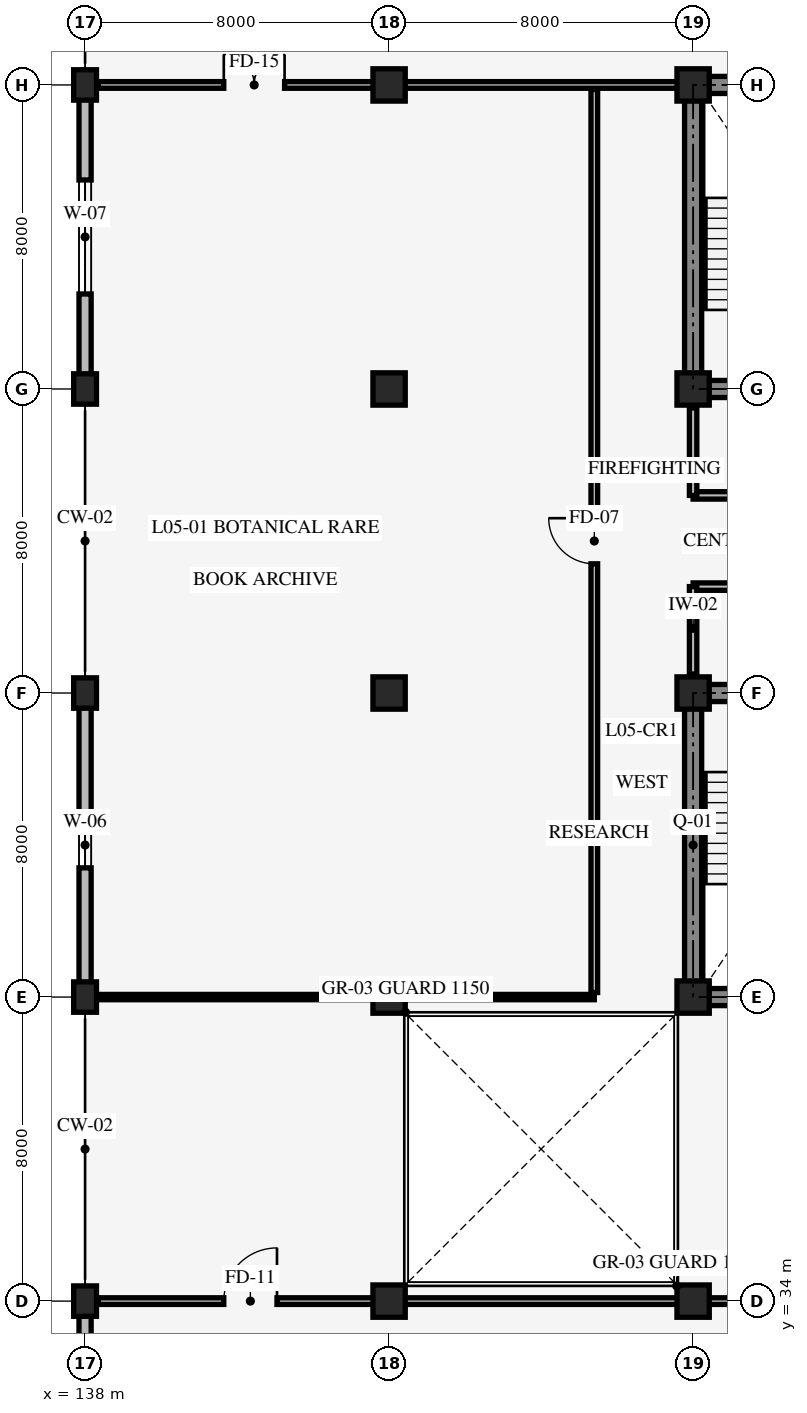
"""IFC4 building model, lengths in metres.
Left out: names, types, materials, properties, quantities, classifications, styles, units other than length and angle.
Written with IfcOpenShell. Run it as: python <this file> out.ifc"""

import sys

from ifc_helpers import new_model, si_unit, direction, frame, frame_2d, origin, origin_2d, place, context, subcontext, project, spatial, rectangle, extrude, element, fill, save


model = new_model("IFC4")
c1 = context("Model", 3, precision=1e-05, world=origin(), true_north=direction((0.0, 1.0)))
c2 = subcontext(c1, "Body", "Model", "MODEL_VIEW")
j1 = project(units=[si_unit("LENGTHUNIT", "METRE"), si_unit("PLANEANGLEUNIT", "RADIAN")], contexts=[c1])
p1 = place(None, origin())
s1 = spatial("IfcSite", under=j1, at=p1, CompositionType="ELEMENT")
p2 = place(p1, origin())
s2 = spatial("IfcBuilding", under=s1, at=p2, CompositionType="ELEMENT")
p3 = place(p2, frame((0.0, 0.0, 19.2)))
s3 = spatial("IfcBuildingStorey", under=s2, at=p3, CompositionType="ELEMENT", Elevation=19.2)
p4 = place(p3, frame((154.0, 42.0, 0.0), z_axis=(0.0, 0.0, 1.0), x_axis=(1.0, 0.0, 0.0)))
e1 = element("IfcWall", 1, at=p4, inside=s3, PredefinedType="SHEAR", context=c2, shape_type="SweptSolid", body=[
    extrude(rectangle(XDim=8.0, YDim=0.45, at=frame_2d((4.0, 0.0))), origin(), (0.0, 0.0, 1.0), 3.95),
])
p5 = place(p3, frame((162.0, 50.0, 0.0), z_axis=(0.0, 0.0, 1.0), x_axis=(-1.0, 0.0, 0.0)))
e2 = element("IfcWall", 2, at=p5, inside=s3, PredefinedType="SHEAR", context=c2, shape_type="SweptSolid", body=[
    extrude(rectangle(XDim=8.0, YDim=0.45, at=frame_2d((4.0, 0.0))), origin(), (0.0, 0.0, 1.0), 3.95),
])
p6 = place(p5, frame((5.3, 0.0, 0.0)))
e3 = element("IfcOpeningElement", 3, at=p6, cuts=e2, PredefinedType="OPENING", context=c2, shape_type="SweptSolid", body=[
    extrude(rectangle(XDim=1.3, YDim=2.15, at=frame_2d((0.65, 1.075))), frame((0.0, 0.235, 0.0), z_axis=(0.0, -1.0, 0.0), x_axis=(1.0, 0.0, 0.0)), (0.0, 0.0, 1.0), 0.47),
])
p7 = place(p5, frame((1.45, 0.0, 0.0)))
e4 = element("IfcOpeningElement", 4, at=p7, cuts=e2, PredefinedType="OPENING", context=c2, shape_type="SweptSolid", body=[
    extrude(rectangle(XDim=1.1, YDim=2.2, at=frame_2d((0.55, 1.1))), frame((0.0, 0.235, 0.0), z_axis=(0.0, -1.0, 0.0), x_axis=(1.0, 0.0, 0.0)), (0.0, 0.0, 1.0), 0.47),
])
p8 = place(p3, frame((154.0, 50.0, 0.0), z_axis=(0.0, 0.0, 1.0), x_axis=(0.0, -1.0, 0.0)))
e5 = element("IfcWall", 5, at=p8, inside=s3, PredefinedType="SHEAR", context=c2, shape_type="SweptSolid", body=[
    extrude(rectangle(XDim=8.0, YDim=0.45, at=frame_2d((4.0, 0.0))), origin(), (0.0, 0.0, 1.0), 3.95),
])
p9 = place(p3, frame((154.0, 58.0, 0.0), z_axis=(0.0, 0.0, 1.0), x_axis=(1.0, 0.0, 0.0)))
e6 = element("IfcWall", 6, at=p9, inside=s3, PredefinedType="SHEAR", context=c2, shape_type="SweptSolid", body=[
    extrude(rectangle(XDim=8.0, YDim=0.45, at=frame_2d((4.0, 0.0))), origin(), (0.0, 0.0, 1.0), 3.95),
])
p10 = place(p9, frame((1.4, 0.0, 0.0)))
e7 = element("IfcOpeningElement", 7, at=p10, cuts=e6, PredefinedType="OPENING", context=c2, shape_type="SweptSolid", body=[
    extrude(rectangle(XDim=1.3, YDim=2.15, at=frame_2d((0.65, 1.075))), frame((0.0, 0.235, 0.0), z_axis=(0.0, -1.0, 0.0), x_axis=(1.0, 0.0, 0.0)), (0.0, 0.0, 1.0), 0.47),
])
p11 = place(p9, frame((5.3, 0.0, 0.0)))
e8 = element("IfcOpeningElement", 8, at=p11, cuts=e6, PredefinedType="OPENING", context=c2, shape_type="SweptSolid", body=[
    extrude(rectangle(XDim=1.1, YDim=2.2, at=frame_2d((0.55, 1.1))), frame((0.0, 0.235, 0.0), z_axis=(0.0, -1.0, 0.0), x_axis=(1.0, 0.0, 0.0)), (0.0, 0.0, 1.0), 0.47),
])
for number, where, z_axis, x_axis in (
    (9, (162.0, 66.0, 0.0), (0.0, 0.0, 1.0), (-1.0, 0.0, 0.0)),
    (10, (154.0, 66.0, 0.0), (0.0, 0.0, 1.0), (0.0, -1.0, 0.0)),
):
    element("IfcWall", number, at=place(p3, frame(where, z_axis=z_axis, x_axis=x_axis)), inside=s3, PredefinedType="SHEAR", context=c2, shape_type="SweptSolid", body=[
        extrude(rectangle(XDim=8.0, YDim=0.45, at=frame_2d((4.0, 0.0))), origin(), (0.0, 0.0, 1.0), 3.95),
    ])
for number, where, z_axis, x_axis in (
    (11, (138.0, 34.0, 0.0), (0.0, 0.0, 1.0), (1.0, 0.0, 0.0)),
    (12, (138.0, 42.0, 0.0), (0.0, 0.0, 1.0), (1.0, 0.0, 0.0)),
    (13, (138.0, 50.0, 0.0), (0.0, 0.0, 1.0), (1.0, 0.0, 0.0)),
    (14, (138.0, 58.0, 0.0), (0.0, 0.0, 1.0), (1.0, 0.0, 0.0)),
    (15, (138.0, 66.0, 0.0), (0.0, 0.0, 1.0), (1.0, 0.0, 0.0)),
):
    element("IfcColumn", number, at=place(p3, frame(where, z_axis=z_axis, x_axis=x_axis)), inside=s3, PredefinedType="COLUMN", context=c2, shape_type="SweptSolid", body=[
        extrude(rectangle(XDim=0.6, YDim=0.8, at=origin_2d()), origin(), (0.0, 0.0, 1.0), 4.2),
    ])
for number, where, z_axis, x_axis in (
    (16, (146.0, 34.0, 0.0), (0.0, 0.0, 1.0), (1.0, 0.0, 0.0)),
    (17, (146.0, 42.0, 0.0), (0.0, 0.0, 1.0), (1.0, 0.0, 0.0)),
    (18, (146.0, 50.0, 0.0), (0.0, 0.0, 1.0), (1.0, 0.0, 0.0)),
    (19, (146.0, 58.0, 0.0), (0.0, 0.0, 1.0), (1.0, 0.0, 0.0)),
    (20, (146.0, 66.0, 0.0), (0.0, 0.0, 1.0), (1.0, 0.0, 0.0)),
    (21, (154.0, 34.0, 0.0), (0.0, 0.0, 1.0), (1.0, 0.0, 0.0)),
    (22, (154.0, 42.0, 0.0), (0.0, 0.0, 1.0), (1.0, 0.0, 0.0)),
    (23, (154.0, 50.0, 0.0), (0.0, 0.0, 1.0), (1.0, 0.0, 0.0)),
    (24, (154.0, 58.0, 0.0), (0.0, 0.0, 1.0), (1.0, 0.0, 0.0)),
    (25, (154.0, 66.0, 0.0), (0.0, 0.0, 1.0), (1.0, 0.0, 0.0)),
):
    element("IfcColumn", number, at=place(p3, frame(where, z_axis=z_axis, x_axis=x_axis)), inside=s3, PredefinedType="COLUMN", context=c2, shape_type="SweptSolid", body=[
        extrude(rectangle(XDim=0.85, YDim=0.85, at=origin_2d()), origin(), (0.0, 0.0, 1.0), 4.2),
    ])
p12 = place(p3, frame((138.0, 26.0, 0.0), z_axis=(0.0, 0.0, 1.0), x_axis=(0.0, 1.0, 0.0)))
e26 = element("IfcWall", 26, at=p12, inside=s3, PredefinedType="STANDARD", context=c2, shape_type="SweptSolid", body=[
    extrude(rectangle(XDim=8.0, YDim=0.32, at=frame_2d((4.0, 0.0))), origin(), (0.0, 0.0, 1.0), 3.19),
])
p13 = place(p12, frame((3.25, 0.0, 0.85)))
e27 = element("IfcOpeningElement", 27, at=p13, cuts=e26, PredefinedType="OPENING", context=c2, shape_type="SweptSolid", body=[
    extrude(rectangle(XDim=1.5, YDim=1.5, at=frame_2d((0.75, 0.75))), frame((0.0, 0.17, 0.0), z_axis=(0.0, -1.0, 0.0), x_axis=(1.0, 0.0, 0.0)), (0.0, 0.0, 1.0), 0.34),
])
p14 = place(p3, frame((138.0, 42.0, 0.0), z_axis=(0.0, 0.0, 1.0), x_axis=(0.0, 1.0, 0.0)))
e28 = element("IfcWall", 28, at=p14, inside=s3, PredefinedType="STANDARD", context=c2, shape_type="SweptSolid", body=[
    extrude(rectangle(XDim=8.0, YDim=0.32, at=frame_2d((4.0, 0.0))), origin(), (0.0, 0.0, 1.0), 3.19),
])
p15 = place(p14, frame((3.4, 0.0, 0.85)))
e29 = element("IfcOpeningElement", 29, at=p15, cuts=e28, PredefinedType="OPENING", context=c2, shape_type="SweptSolid", body=[
    extrude(rectangle(XDim=1.2, YDim=1.2, at=frame_2d((0.6, 0.6))), frame((0.0, 0.17, 0.0), z_axis=(0.0, -1.0, 0.0), x_axis=(1.0, 0.0, 0.0)), (0.0, 0.0, 1.0), 0.34),
])
p16 = place(p3, frame((138.0, 58.0, 0.0), z_axis=(0.0, 0.0, 1.0), x_axis=(0.0, 1.0, 0.0)))
e30 = element("IfcWall", 30, at=p16, inside=s3, PredefinedType="STANDARD", context=c2, shape_type="SweptSolid", body=[
    extrude(rectangle(XDim=8.0, YDim=0.32, at=frame_2d((4.0, 0.0))), origin(), (0.0, 0.0, 1.0), 3.19),
])
p17 = place(p16, frame((2.5, 0.0, 0.85)))
e31 = element("IfcOpeningElement", 31, at=p17, cuts=e30, PredefinedType="OPENING", context=c2, shape_type="SweptSolid", body=[
    extrude(rectangle(XDim=3.0, YDim=1.8, at=frame_2d((1.5, 0.9))), frame((0.0, 0.17, 0.0), z_axis=(0.0, -1.0, 0.0), x_axis=(1.0, 0.0, 0.0)), (0.0, 0.0, 1.0), 0.34),
])
p18 = place(p3, frame((154.0, 52.8, 0.0), z_axis=(0.0, 0.0, 1.0), x_axis=(1.0, 0.0, 0.0)))
e32 = element("IfcWall", 32, at=p18, inside=s3, PredefinedType="STANDARD", context=c2, shape_type="SweptSolid", body=[
    extrude(rectangle(XDim=7.6, YDim=0.195, at=frame_2d((3.8, 0.0))), origin(), (0.0, 0.0, 1.0), 3.9),
])
p19 = place(p18, frame((2.8, 0.0, 0.0)))
e33 = element("IfcOpeningElement", 33, at=p19, cuts=e32, PredefinedType="OPENING", context=c2, shape_type="SweptSolid", body=[
    extrude(rectangle(XDim=1.45, YDim=2.2, at=frame_2d((0.725, 1.1))), frame((0.0, 0.107, 0.0), z_axis=(0.0, -1.0, 0.0), x_axis=(1.0, 0.0, 0.0)), (0.0, 0.0, 1.0), 0.215),
])
p20 = place(p3, frame((154.0, 50.5, 0.0), z_axis=(0.0, 0.0, 1.0), x_axis=(0.0, 1.0, 0.0)))
e34 = element("IfcWall", 34, at=p20, inside=s3, PredefinedType="STANDARD", context=c2, shape_type="SweptSolid", body=[
    extrude(rectangle(XDim=2.3, YDim=0.195, at=frame_2d((1.15, 0.0))), origin(), (0.0, 0.0, 1.0), 3.19),
])
p21 = place(p3, frame((154.0, 55.2, 0.0), z_axis=(0.0, 0.0, 1.0), x_axis=(1.0, 0.0, 0.0)))
e35 = element("IfcWall", 35, at=p21, inside=s3, PredefinedType="STANDARD", context=c2, shape_type="SweptSolid", body=[
    extrude(rectangle(XDim=7.6, YDim=0.195, at=frame_2d((3.8, 0.0))), origin(), (0.0, 0.0, 1.0), 3.9),
])
p22 = place(p21, frame((2.8, 0.0, 0.0)))
e36 = element("IfcOpeningElement", 36, at=p22, cuts=e35, PredefinedType="OPENING", context=c2, shape_type="SweptSolid", body=[
    extrude(rectangle(XDim=1.25, YDim=2.15, at=frame_2d((0.625, 1.075))), frame((0.0, 0.107, 0.0), z_axis=(0.0, -1.0, 0.0), x_axis=(1.0, 0.0, 0.0)), (0.0, 0.0, 1.0), 0.215),
])
p23 = place(p3, frame((154.0, 55.2, 0.0), z_axis=(0.0, 0.0, 1.0), x_axis=(0.0, 1.0, 0.0)))
e37 = element("IfcWall", 37, at=p23, inside=s3, PredefinedType="STANDARD", context=c2, shape_type="SweptSolid", body=[
    extrude(rectangle(XDim=2.3, YDim=0.195, at=frame_2d((1.15, 0.0))), origin(), (0.0, 0.0, 1.0), 3.19),
])
p24 = place(p3, frame((138.12, 42.0, 0.0), z_axis=(0.0, 0.0, 1.0), x_axis=(1.0, 0.0, 0.0)))
e38 = element("IfcWall", 38, at=p24, inside=s3, PredefinedType="STANDARD", context=c2, shape_type="SweptSolid", body=[
    extrude(rectangle(XDim=13.28, YDim=0.14, at=frame_2d((6.64, 0.0))), origin(), (0.0, 0.0, 1.0), 3.14),
])
p25 = place(p3, frame((151.4, 42.12, 0.0), z_axis=(0.0, 0.0, 1.0), x_axis=(0.0, 1.0, 0.0)))
e39 = element("IfcWall", 39, at=p25, inside=s3, PredefinedType="STANDARD", context=c2, shape_type="SweptSolid", body=[
    extrude(rectangle(XDim=23.76, YDim=0.175, at=frame_2d((11.88, 0.0))), origin(), (0.0, 0.0, 1.0), 3.9),
])
p26 = place(p25, frame((11.28, 0.0, 0.0)))
e40 = element("IfcOpeningElement", 40, at=p26, cuts=e39, PredefinedType="OPENING", context=c2, shape_type="SweptSolid", body=[
    extrude(rectangle(XDim=1.2, YDim=2.1, at=frame_2d((0.6, 1.05))), frame((0.0, 0.098, 0.0), z_axis=(0.0, -1.0, 0.0), x_axis=(1.0, 0.0, 0.0)), (0.0, 0.0, 1.0), 0.195),
])
p27 = place(p3, frame((138.35, 34.0, 0.0), z_axis=(0.0, 0.0, 1.0), x_axis=(1.0, 0.0, 0.0)))
e41 = element("IfcWall", 41, at=p27, inside=s3, PredefinedType="STANDARD", context=c2, shape_type="SweptSolid", body=[
    extrude(rectangle(XDim=19.3, YDim=0.175, at=frame_2d((9.65, 0.0))), origin(), (0.0, 0.0, 1.0), 3.14),
])
p28 = place(p27, frame((3.3, 0.0, 0.0)))
e42 = element("IfcOpeningElement", 42, at=p28, cuts=e41, PredefinedType="OPENING", context=c2, shape_type="SweptSolid", body=[
    extrude(rectangle(XDim=1.4, YDim=2.2, at=frame_2d((0.7, 1.1))), frame((0.0, 0.098, 0.0), z_axis=(0.0, -1.0, 0.0), x_axis=(1.0, 0.0, 0.0)), (0.0, 0.0, 1.0), 0.195),
])
p29 = place(p3, frame((138.35, 66.0, 0.0), z_axis=(0.0, 0.0, 1.0), x_axis=(1.0, 0.0, 0.0)))
e43 = element("IfcWall", 43, at=p29, inside=s3, PredefinedType="STANDARD", context=c2, shape_type="SweptSolid", body=[
    extrude(rectangle(XDim=15.3, YDim=0.175, at=frame_2d((7.65, 0.0))), origin(), (0.0, 0.0, 1.0), 3.14),
])
p30 = place(p29, frame((3.3, 0.0, 0.0)))
e44 = element("IfcOpeningElement", 44, at=p30, cuts=e43, PredefinedType="OPENING", context=c2, shape_type="SweptSolid", body=[
    extrude(rectangle(XDim=1.6, YDim=2.25, at=frame_2d((0.8, 1.125))), frame((0.0, 0.098, 0.0), z_axis=(0.0, -1.0, 0.0), x_axis=(1.0, 0.0, 0.0)), (0.0, 0.0, 1.0), 0.195),
])
p31 = place(p15, origin())
e45 = element("IfcWindow", 45, at=p31, inside=s3, PartitioningType="SINGLE_PANEL", PredefinedType="WINDOW", context=c2, shape_type="SweptSolid", body=[
    extrude(rectangle(XDim=1.2, YDim=1.2, at=frame_2d((0.6, 0.6))), frame((0.0, 0.03, 0.0), z_axis=(0.0, -1.0, 0.0), x_axis=(1.0, 0.0, 0.0)), (0.0, 0.0, 1.0), 0.06),
])
fill(e29, e45)
p32 = place(p17, origin())
e46 = element("IfcWindow", 46, at=p32, inside=s3, PartitioningType="SINGLE_PANEL", PredefinedType="WINDOW", context=c2, shape_type="SweptSolid", body=[
    extrude(rectangle(XDim=3.0, YDim=1.8, at=frame_2d((1.5, 0.9))), frame((0.0, 0.03, 0.0), z_axis=(0.0, -1.0, 0.0), x_axis=(1.0, 0.0, 0.0)), (0.0, 0.0, 1.0), 0.06),
])
fill(e31, e46)
p33 = place(p26, origin())
e47 = element("IfcDoor", 47, at=p33, inside=s3, OperationType="SINGLE_SWING_RIGHT", PredefinedType="DOOR", context=c2, shape_type="SweptSolid", body=[
    extrude(rectangle(XDim=1.2, YDim=2.1, at=frame_2d((0.6, 1.05))), frame((0.0, 0.025, 0.0), z_axis=(0.0, -1.0, 0.0), x_axis=(1.0, 0.0, 0.0)), (0.0, 0.0, 1.0), 0.05),
])
fill(e40, e47)
p34 = place(p28, origin())
e48 = element("IfcDoor", 48, at=p34, inside=s3, OperationType="SINGLE_SWING_RIGHT", PredefinedType="DOOR", context=c2, shape_type="SweptSolid", body=[
    extrude(rectangle(XDim=1.4, YDim=2.2, at=frame_2d((0.7, 1.1))), frame((0.0, 0.025, 0.0), z_axis=(0.0, -1.0, 0.0), x_axis=(1.0, 0.0, 0.0)), (0.0, 0.0, 1.0), 0.05),
])
fill(e42, e48)
p35 = place(p30, origin())
e49 = element("IfcDoor", 49, at=p35, inside=s3, OperationType="DOUBLE_DOOR_SINGLE_SWING", PredefinedType="DOOR", context=c2, shape_type="SweptSolid", body=[
    extrude(rectangle(XDim=1.6, YDim=2.25, at=frame_2d((0.8, 1.125))), frame((0.0, 0.025, 0.0), z_axis=(0.0, -1.0, 0.0), x_axis=(1.0, 0.0, 0.0)), (0.0, 0.0, 1.0), 0.05),
])
fill(e44, e49)
save(model, sys.argv[1])
